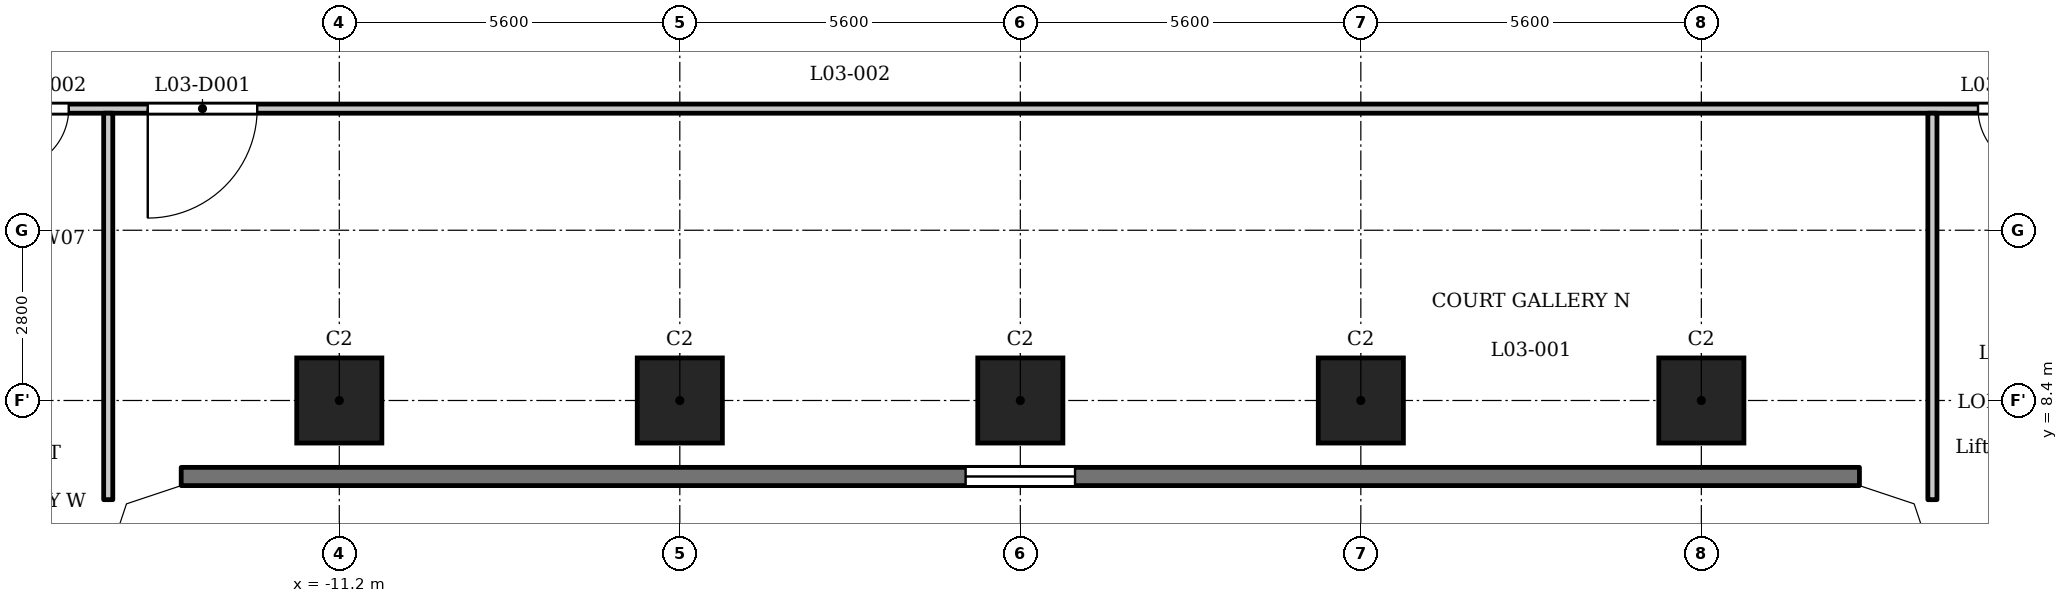
"""IFC4 building model, lengths in metres.
Left out: names, types, materials, properties, quantities, classifications, styles, units other than length and angle.
Written with IfcOpenShell. Run it as: python <this file> out.ifc"""

import sys

from ifc_helpers import new_model, si_unit, direction, frame, frame_2d, origin, origin_2d, place, context, subcontext, project, spatial, polyline, rectangle, outline, extrude, element, fill, save


model = new_model("IFC4")
c1 = context("Model", 3, precision=1e-05, world=origin(), true_north=direction((0.0, 1.0)))
c2 = subcontext(c1, "Body", "Model", "MODEL_VIEW")
j1 = project(units=[si_unit("LENGTHUNIT", "METRE"), si_unit("PLANEANGLEUNIT", "RADIAN")], contexts=[c1])
p1 = place(None, origin())
s1 = spatial("IfcSite", under=j1, at=p1, CompositionType="ELEMENT")
p2 = place(p1, origin())
s2 = spatial("IfcBuilding", under=s1, at=p2, CompositionType="ELEMENT")
p3 = place(p2, frame((0.0, 0.0, 16.1)))
s3 = spatial("IfcBuildingStorey", under=s2, at=p3, CompositionType="ELEMENT", Elevation=16.1)
for number, where, z_axis, x_axis in (
    (1, (-11.2, 8.4, 0.0), (0.0, 0.0, 1.0), (1.0, 0.0, 0.0)),
    (2, (-5.6, 8.4, 0.0), (0.0, 0.0, 1.0), (1.0, 0.0, 0.0)),
    (3, (0.0, 8.4, 0.0), (0.0, 0.0, 1.0), (1.0, 0.0, 0.0)),
    (4, (5.6, 8.4, 0.0), (0.0, 0.0, 1.0), (1.0, 0.0, 0.0)),
    (5, (11.2, 8.4, 0.0), (0.0, 0.0, 1.0), (1.0, 0.0, 0.0)),
):
    element("IfcColumn", number, at=place(p3, frame(where, z_axis=z_axis, x_axis=x_axis)), inside=s3, PredefinedType="COLUMN", context=c2, shape_type="SweptSolid", body=[
        extrude(rectangle(XDim=1.4, YDim=1.4, at=origin_2d()), origin(), (0.0, 0.0, 1.0), 4.8),
    ])
p4 = place(p3, frame((-13.8, 7.15, 0.0), z_axis=(0.0, 0.0, 1.0), x_axis=(1.0, 0.0, 0.0)))
e6 = element("IfcWall", 6, at=p4, inside=s3, PredefinedType="SOLIDWALL", context=c2, shape_type="SweptSolid", body=[
    extrude(rectangle(XDim=27.6, YDim=0.3, at=frame_2d((13.8, 0.0))), origin(), (0.0, 0.0, 1.0), 4.45),
])
p5 = place(p4, frame((12.9, 0.0, 0.9)))
e7 = element("IfcOpeningElement", 7, at=p5, cuts=e6, PredefinedType="OPENING", context=c2, shape_type="SweptSolid", body=[
    extrude(rectangle(XDim=1.8, YDim=1.25, at=frame_2d((0.9, 0.625))), frame((0.0, 0.16, 0.0), z_axis=(0.0, -1.0, 0.0), x_axis=(1.0, 0.0, 0.0)), (0.0, 0.0, 1.0), 0.32),
])
p6 = place(p3, frame((-17.4, 13.2, 0.0), z_axis=(0.0, 0.0, 1.0), x_axis=(1.0, 0.0, 0.0)))
e8 = element("IfcWall", 8, at=p6, inside=s3, PredefinedType="PARTITIONING", context=c2, shape_type="SweptSolid", body=[
    extrude(rectangle(XDim=34.8, YDim=0.15, at=frame_2d((17.4, 0.0))), origin(), (0.0, 0.0, 1.0), 4.45),
])
p7 = place(p6, frame((3.05, 0.0, 0.0)))
e9 = element("IfcOpeningElement", 9, at=p7, cuts=e8, PredefinedType="OPENING", context=c2, shape_type="SweptSolid", body=[
    extrude(rectangle(XDim=1.8, YDim=2.1, at=frame_2d((0.9, 1.05))), frame((0.0, 0.085, 0.0), z_axis=(0.0, -1.0, 0.0), x_axis=(1.0, 0.0, 0.0)), (0.0, 0.0, 1.0), 0.17),
])
p8 = place(p6, frame((0.75, 0.0, 0.0)))
e10 = element("IfcOpeningElement", 10, at=p8, cuts=e8, PredefinedType="OPENING", context=c2, shape_type="SweptSolid", body=[
    extrude(rectangle(XDim=1.0, YDim=2.1, at=frame_2d((0.5, 1.05))), frame((0.0, 0.085, 0.0), z_axis=(0.0, -1.0, 0.0), x_axis=(1.0, 0.0, 0.0)), (0.0, 0.0, 1.0), 0.17),
])
p9 = place(p6, frame((33.15, 0.0, 0.0)))
e11 = element("IfcOpeningElement", 11, at=p9, cuts=e8, PredefinedType="OPENING", context=c2, shape_type="SweptSolid", body=[
    extrude(rectangle(XDim=1.0, YDim=2.1, at=frame_2d((0.5, 1.05))), frame((0.0, 0.085, 0.0), z_axis=(0.0, -1.0, 0.0), x_axis=(1.0, 0.0, 0.0)), (0.0, 0.0, 1.0), 0.17),
])
for number, where, z_axis, x_axis in (
    (12, (-15.0, 6.769, 0.0), (0.0, 0.0, 1.0), (0.0, 1.0, 0.0)),
    (13, (15.0, 6.769, 0.0), (0.0, 0.0, 1.0), (0.0, 1.0, 0.0)),
):
    element("IfcWall", number, at=place(p3, frame(where, z_axis=z_axis, x_axis=x_axis)), inside=s3, PredefinedType="PARTITIONING", context=c2, shape_type="SweptSolid", body=[
        extrude(rectangle(XDim=6.356, YDim=0.15, at=frame_2d((3.178, 0.0))), origin(), (0.0, 0.0, 1.0), 4.45),
    ])
p10 = place(p3, origin())
e14 = element("IfcWall", 14, at=p10, inside=s3, PredefinedType="SOLIDWALL", context=c2, shape_type="SweptSolid", body=[
    extrude(outline(polyline([(-13.849, 7.3), (-14.937, 6.937), (-15.3, 5.849), (-15.3, 5.8), (-15.0, 5.8), (-14.7, 6.7), (-13.8, 7.0), (-13.8, 7.3), (-13.849, 7.3)])), origin(), (0.0, 0.0, 1.0), 4.45),
])
e15 = element("IfcWall", 15, at=p10, inside=s3, PredefinedType="SOLIDWALL", context=c2, shape_type="SweptSolid", body=[
    extrude(outline(polyline([(14.937, 6.937), (13.849, 7.3), (13.8, 7.3), (13.8, 7.0), (14.7, 6.7), (15.0, 5.8), (15.3, 5.8), (15.3, 5.849), (14.937, 6.937)])), origin(), (0.0, 0.0, 1.0), 4.45),
])
p11 = place(p7, origin())
e16 = element("IfcDoor", 16, at=p11, inside=s3, OperationType="SINGLE_SWING_LEFT", PredefinedType="DOOR", context=c2, shape_type="SweptSolid", body=[
    extrude(rectangle(XDim=1.8, YDim=2.1, at=frame_2d((0.9, 1.05))), frame((0.0, 0.025, 0.0), z_axis=(0.0, -1.0, 0.0), x_axis=(1.0, 0.0, 0.0)), (0.0, 0.0, 1.0), 0.05),
])
fill(e9, e16)
p12 = place(p8, origin())
e17 = element("IfcDoor", 17, at=p12, inside=s3, OperationType="SINGLE_SWING_LEFT", PredefinedType="DOOR", context=c2, shape_type="SweptSolid", body=[
    extrude(rectangle(XDim=1.0, YDim=2.1, at=frame_2d((0.5, 1.05))), frame((0.0, 0.025, 0.0), z_axis=(0.0, -1.0, 0.0), x_axis=(1.0, 0.0, 0.0)), (0.0, 0.0, 1.0), 0.05),
])
fill(e10, e17)
p13 = place(p9, origin())
e18 = element("IfcDoor", 18, at=p13, inside=s3, OperationType="SINGLE_SWING_RIGHT", PredefinedType="DOOR", context=c2, shape_type="SweptSolid", body=[
    extrude(rectangle(XDim=1.0, YDim=2.1, at=frame_2d((0.5, 1.05))), frame((0.0, 0.025, 0.0), z_axis=(0.0, -1.0, 0.0), x_axis=(1.0, 0.0, 0.0)), (0.0, 0.0, 1.0), 0.05),
])
fill(e11, e18)
p14 = place(p5, origin())
e19 = element("IfcWindow", 19, at=p14, inside=s3, PartitioningType="SINGLE_PANEL", PredefinedType="WINDOW", context=c2, shape_type="SweptSolid", body=[
    extrude(rectangle(XDim=1.8, YDim=1.25, at=frame_2d((0.9, 0.625))), frame((0.0, 0.03, 0.0), z_axis=(0.0, -1.0, 0.0), x_axis=(1.0, 0.0, 0.0)), (0.0, 0.0, 1.0), 0.06),
])
fill(e7, e19)
save(model, sys.argv[1])
